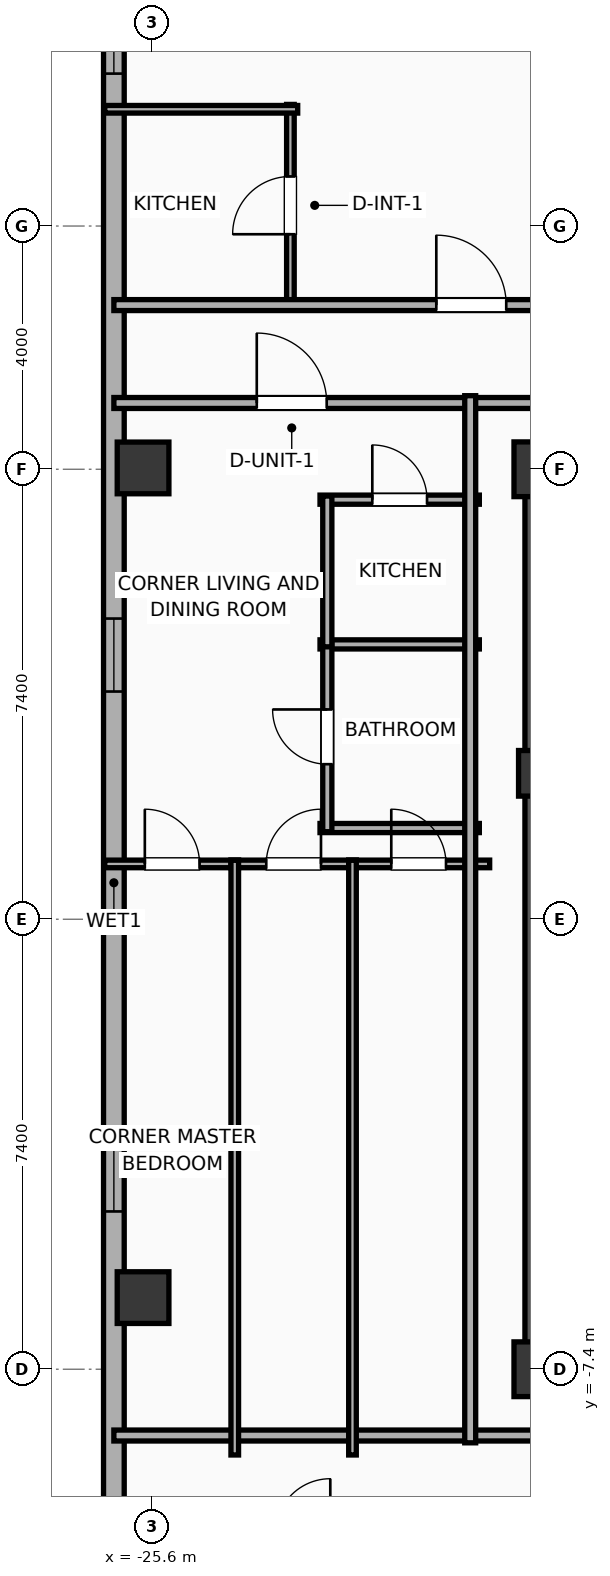
"""IFC4 building model, lengths in metres.
Left out: names, types, materials, properties, quantities, classifications, styles, units other than length and angle.
Written with IfcOpenShell. Run it as: python <this file> out.ifc"""

import sys

from ifc_helpers import new_model, si_unit, direction, frame, frame_2d, origin, origin_2d, place, context, subcontext, project, spatial, rectangle, hollow_rectangle, extrude, element, fill, save


model = new_model("IFC4")
c1 = context("Model", 3, precision=1e-05, world=origin(), true_north=direction((0.0, 1.0)))
c2 = subcontext(c1, "Body", "Model", "MODEL_VIEW")
j1 = project(units=[si_unit("LENGTHUNIT", "METRE"), si_unit("PLANEANGLEUNIT", "RADIAN")], contexts=[c1])
p1 = place(None, origin())
s1 = spatial("IfcSite", under=j1, at=p1, CompositionType="ELEMENT")
p2 = place(p1, origin())
s2 = spatial("IfcBuilding", under=s1, at=p2, CompositionType="ELEMENT")
p3 = place(p2, frame((0.0, 0.0, 235.3)))
s3 = spatial("IfcBuildingStorey", under=s2, at=p3, CompositionType="ELEMENT", Elevation=235.3)
p4 = place(p3, frame((-19.2, -7.4, 0.0), z_axis=(0.0, 0.0, 1.0), x_axis=(1.0, 0.0, 0.0)))
e1 = element("IfcColumn", 1, at=p4, inside=s3, PredefinedType="COLUMN", context=c2, shape_type="SweptSolid", body=[
    extrude(rectangle(XDim=0.9, YDim=0.9, at=origin_2d()), origin(), (0.0, 0.0, 1.0), 3.9),
])
p5 = place(p3, frame((-19.2, 2.4, 0.0), z_axis=(0.0, 0.0, 1.0), x_axis=(1.0, 0.0, 0.0)))
e2 = element("IfcColumn", 2, at=p5, inside=s3, PredefinedType="COLUMN", context=c2, shape_type="SweptSolid", body=[
    extrude(rectangle(XDim=0.75, YDim=0.75, at=origin_2d()), origin(), (0.0, 0.0, 1.0), 3.9),
])
p6 = place(p3, frame((-19.2, 7.4, 0.0), z_axis=(0.0, 0.0, 1.0), x_axis=(1.0, 0.0, 0.0)))
e3 = element("IfcColumn", 3, at=p6, inside=s3, PredefinedType="COLUMN", context=c2, shape_type="SweptSolid", body=[
    extrude(rectangle(XDim=0.9, YDim=0.9, at=origin_2d()), origin(), (0.0, 0.0, 1.0), 3.9),
])
for number, where, z_axis, x_axis in (
    (4, (-19.425, -7.4, 0.0), (0.0, 0.0, 1.0), (1.0, 0.0, 0.0)),
    (5, (-19.425, 7.4, 0.0), (0.0, 0.0, 1.0), (1.0, 0.0, 0.0)),
):
    element("IfcWall", number, at=place(p3, frame(where, z_axis=z_axis, x_axis=x_axis)), inside=s3, PredefinedType="SHEAR", context=c2, shape_type="SweptSolid", body=[
        extrude(rectangle(XDim=7.25, YDim=0.45, at=frame_2d((3.625, 0.0))), origin(), (0.0, 0.0, 1.0), 3.65),
    ])
p7 = place(p3, frame((-19.145, -7.4, 0.0), z_axis=(0.0, 0.0, 1.0), x_axis=(0.0, 1.0, 0.0)))
e6 = element("IfcWall", 6, at=p7, inside=s3, PredefinedType="SHEAR", context=c2, shape_type="SweptSolid", body=[
    extrude(rectangle(XDim=14.8, YDim=0.65, at=frame_2d((7.4, 0.0))), origin(), (0.0, 0.0, 1.0), 3.65),
])
for number, where, z_axis, x_axis in (
    (7, (-25.75, 7.422, 0.0), (0.0, 0.0, 1.0), (1.0, 0.0, 0.0)),
    (8, (-25.75, -6.222, 0.0), (0.0, 0.0, 1.0), (1.0, 0.0, 0.0)),
):
    element("IfcColumn", number, at=place(p3, frame(where, z_axis=z_axis, x_axis=x_axis)), inside=s3, PredefinedType="COLUMN", context=c2, shape_type="SweptSolid", body=[
        extrude(hollow_rectangle(XDim=0.85, YDim=0.85, WallThickness=0.028, at=origin_2d()), origin(), (0.0, 0.0, 1.0), 3.9),
    ])
p8 = place(p3, frame((-26.23, -15.383, 0.0), z_axis=(0.0, 0.0, 1.0), x_axis=(0.0, 1.0, 0.0)))
e9 = element("IfcWall", 9, at=p8, inside=s3, PredefinedType="ELEMENTEDWALL", context=c2, shape_type="SweptSolid", body=[
    extrude(rectangle(XDim=31.967, YDim=0.34, at=frame_2d((15.983, 0.0))), origin(), (0.0, 0.0, 1.0), 3.65),
])
p9 = place(p8, frame((29.29, 0.0, 0.75)))
e10 = element("IfcOpeningElement", 10, at=p9, cuts=e9, PredefinedType="OPENING", context=c2, shape_type="SweptSolid", body=[
    extrude(rectangle(XDim=1.2, YDim=2.05, at=frame_2d((0.6, 1.025))), frame((0.0, 0.18, 0.0), z_axis=(0.0, -1.0, 0.0), x_axis=(1.0, 0.0, 0.0)), (0.0, 0.0, 1.0), 0.36),
])
p10 = place(p8, frame((19.128, 0.0, 0.75)))
e11 = element("IfcOpeningElement", 11, at=p10, cuts=e9, PredefinedType="OPENING", context=c2, shape_type="SweptSolid", body=[
    extrude(rectangle(XDim=1.2, YDim=2.05, at=frame_2d((0.6, 1.025))), frame((0.0, 0.18, 0.0), z_axis=(0.0, -1.0, 0.0), x_axis=(1.0, 0.0, 0.0)), (0.0, 0.0, 1.0), 0.36),
])
p11 = place(p8, frame((10.578, 0.0, 0.75)))
e12 = element("IfcOpeningElement", 12, at=p11, cuts=e9, PredefinedType="OPENING", context=c2, shape_type="SweptSolid", body=[
    extrude(rectangle(XDim=1.2, YDim=2.05, at=frame_2d((0.6, 1.025))), frame((0.0, 0.18, 0.0), z_axis=(0.0, -1.0, 0.0), x_axis=(1.0, 0.0, 0.0)), (0.0, 0.0, 1.0), 0.36),
])
p12 = place(p3, frame((-26.23, 8.49, 0.0), z_axis=(0.0, 0.0, 1.0), x_axis=(1.0, 0.0, 0.0)))
e13 = element("IfcWall", 13, at=p12, inside=s3, PredefinedType="PARTITIONING", context=c2, shape_type="SweptSolid", body=[
    extrude(rectangle(XDim=16.35, YDim=0.18, at=frame_2d((8.175, 0.0))), origin(), (0.0, 0.0, 1.0), 3.65),
])
p13 = place(p12, frame((2.35, 0.0, 0.0)))
e14 = element("IfcOpeningElement", 14, at=p13, cuts=e13, PredefinedType="OPENING", context=c2, shape_type="SweptSolid", body=[
    extrude(rectangle(XDim=1.15, YDim=2.05, at=frame_2d((0.575, 1.025))), frame((0.0, 0.1, 0.0), z_axis=(0.0, -1.0, 0.0), x_axis=(1.0, 0.0, 0.0)), (0.0, 0.0, 1.0), 0.2),
])
p14 = place(p3, frame((-26.23, -8.49, 0.0), z_axis=(0.0, 0.0, 1.0), x_axis=(1.0, 0.0, 0.0)))
e15 = element("IfcWall", 15, at=p14, inside=s3, PredefinedType="PARTITIONING", context=c2, shape_type="SweptSolid", body=[
    extrude(rectangle(XDim=16.35, YDim=0.18, at=frame_2d((8.175, 0.0))), origin(), (0.0, 0.0, 1.0), 3.65),
])
p15 = place(p3, frame((-23.327, 10.08, 0.0), z_axis=(0.0, 0.0, 1.0), x_axis=(0.0, 1.0, 0.0)))
e16 = element("IfcWall", 16, at=p15, inside=s3, PredefinedType="PARTITIONING", context=c2, shape_type="SweptSolid", body=[
    extrude(rectangle(XDim=3.32, YDim=0.125, at=frame_2d((1.66, 0.0))), origin(), (0.0, 0.0, 1.0), 3.65),
])
p16 = place(p15, frame((1.185, 0.0, 0.0)))
e17 = element("IfcOpeningElement", 17, at=p16, cuts=e16, PredefinedType="OPENING", context=c2, shape_type="SweptSolid", body=[
    extrude(rectangle(XDim=0.95, YDim=2.05, at=frame_2d((0.475, 1.025))), frame((0.0, 0.073, 0.0), z_axis=(0.0, -1.0, 0.0), x_axis=(1.0, 0.0, 0.0)), (0.0, 0.0, 1.0), 0.145),
])
p17 = place(p3, frame((-26.38, 13.32, 0.0), z_axis=(0.0, 0.0, 1.0), x_axis=(1.0, 0.0, 0.0)))
e18 = element("IfcWall", 18, at=p17, inside=s3, PredefinedType="PARTITIONING", context=c2, shape_type="SweptSolid", body=[
    extrude(rectangle(XDim=3.173, YDim=0.125, at=frame_2d((1.586, 0.0))), origin(), (0.0, 0.0, 1.0), 3.65),
])
p18 = place(p3, frame((-26.23, 10.1, 0.0), z_axis=(0.0, 0.0, 1.0), x_axis=(1.0, 0.0, 0.0)))
e19 = element("IfcWall", 19, at=p18, inside=s3, PredefinedType="PARTITIONING", context=c2, shape_type="SweptSolid", body=[
    extrude(rectangle(XDim=56.46, YDim=0.18, at=frame_2d((28.23, 0.0))), origin(), (0.0, 0.0, 1.0), 3.65),
])
p19 = place(p18, frame((5.302, 0.0, 0.0)))
e20 = element("IfcOpeningElement", 20, at=p19, cuts=e19, PredefinedType="OPENING", context=c2, shape_type="SweptSolid", body=[
    extrude(rectangle(XDim=1.15, YDim=2.05, at=frame_2d((0.575, 1.025))), frame((0.0, 0.1, 0.0), z_axis=(0.0, -1.0, 0.0), x_axis=(1.0, 0.0, 0.0)), (0.0, 0.0, 1.0), 0.2),
])
p20 = place(p18, frame((14.122, 0.0, 0.0)))
e21 = element("IfcOpeningElement", 21, at=p20, cuts=e19, PredefinedType="OPENING", context=c2, shape_type="SweptSolid", body=[
    extrude(rectangle(XDim=1.15, YDim=2.05, at=frame_2d((0.575, 1.025))), frame((0.0, 0.1, 0.0), z_axis=(0.0, -1.0, 0.0), x_axis=(1.0, 0.0, 0.0)), (0.0, 0.0, 1.0), 0.2),
])
p21 = place(p18, frame((21.518, 0.0, 0.0)))
e22 = element("IfcOpeningElement", 22, at=p21, cuts=e19, PredefinedType="OPENING", context=c2, shape_type="SweptSolid", body=[
    extrude(rectangle(XDim=1.15, YDim=2.05, at=frame_2d((0.575, 1.025))), frame((0.0, 0.1, 0.0), z_axis=(0.0, -1.0, 0.0), x_axis=(1.0, 0.0, 0.0)), (0.0, 0.0, 1.0), 0.2),
])
p22 = place(p18, frame((28.92, 0.0, 0.0)))
e23 = element("IfcOpeningElement", 23, at=p22, cuts=e19, PredefinedType="OPENING", context=c2, shape_type="SweptSolid", body=[
    extrude(rectangle(XDim=1.15, YDim=2.05, at=frame_2d((0.575, 1.025))), frame((0.0, 0.1, 0.0), z_axis=(0.0, -1.0, 0.0), x_axis=(1.0, 0.0, 0.0)), (0.0, 0.0, 1.0), 0.2),
])
p23 = place(p18, frame((36.322, 0.0, 0.0)))
e24 = element("IfcOpeningElement", 24, at=p23, cuts=e19, PredefinedType="OPENING", context=c2, shape_type="SweptSolid", body=[
    extrude(rectangle(XDim=1.15, YDim=2.05, at=frame_2d((0.575, 1.025))), frame((0.0, 0.1, 0.0), z_axis=(0.0, -1.0, 0.0), x_axis=(1.0, 0.0, 0.0)), (0.0, 0.0, 1.0), 0.2),
])
p24 = place(p18, frame((43.622, 0.0, 0.0)))
e25 = element("IfcOpeningElement", 25, at=p24, cuts=e19, PredefinedType="OPENING", context=c2, shape_type="SweptSolid", body=[
    extrude(rectangle(XDim=1.15, YDim=2.05, at=frame_2d((0.575, 1.025))), frame((0.0, 0.1, 0.0), z_axis=(0.0, -1.0, 0.0), x_axis=(1.0, 0.0, 0.0)), (0.0, 0.0, 1.0), 0.2),
])
p25 = place(p18, frame((51.781, 0.0, 0.0)))
e26 = element("IfcOpeningElement", 26, at=p25, cuts=e19, PredefinedType="OPENING", context=c2, shape_type="SweptSolid", body=[
    extrude(rectangle(XDim=1.15, YDim=2.05, at=frame_2d((0.575, 1.025))), frame((0.0, 0.1, 0.0), z_axis=(0.0, -1.0, 0.0), x_axis=(1.0, 0.0, 0.0)), (0.0, 0.0, 1.0), 0.2),
])
p26 = place(p3, frame((-22.84, 6.9, 0.0), z_axis=(0.0, 0.0, 1.0), x_axis=(1.0, 0.0, 0.0)))
e27 = element("IfcWall", 27, at=p26, inside=s3, PredefinedType="PLUMBINGWALL", context=c2, shape_type="SweptSolid", body=[
    extrude(rectangle(XDim=2.62, YDim=0.15, at=frame_2d((1.31, 0.0))), origin(), (0.0, 0.0, 1.0), 3.65),
])
p27 = place(p26, frame((0.86, 0.0, 0.0)))
e28 = element("IfcOpeningElement", 28, at=p27, cuts=e27, PredefinedType="OPENING", context=c2, shape_type="SweptSolid", body=[
    extrude(rectangle(XDim=0.9, YDim=2.05, at=frame_2d((0.45, 1.025))), frame((0.0, 0.085, 0.0), z_axis=(0.0, -1.0, 0.0), x_axis=(1.0, 0.0, 0.0)), (0.0, 0.0, 1.0), 0.17),
])
for number, where, z_axis, x_axis in (
    (29, (-22.84, 4.52, 0.0), (0.0, 0.0, 1.0), (1.0, 0.0, 0.0)),
    (30, (-22.84, 1.5, 0.0), (0.0, 0.0, 1.0), (1.0, 0.0, 0.0)),
):
    element("IfcWall", number, at=place(p3, frame(where, z_axis=z_axis, x_axis=x_axis)), inside=s3, PredefinedType="PLUMBINGWALL", context=c2, shape_type="SweptSolid", body=[
        extrude(rectangle(XDim=2.62, YDim=0.15, at=frame_2d((1.31, 0.0))), origin(), (0.0, 0.0, 1.0), 3.65),
    ])
p28 = place(p3, frame((-22.72, 1.44, 0.0), z_axis=(0.0, 0.0, 1.0), x_axis=(0.0, 1.0, 0.0)))
e31 = element("IfcWall", 31, at=p28, inside=s3, PredefinedType="PLUMBINGWALL", context=c2, shape_type="SweptSolid", body=[
    extrude(rectangle(XDim=3.12, YDim=0.15, at=frame_2d((1.56, 0.0))), origin(), (0.0, 0.0, 1.0), 3.65),
])
p29 = place(p28, frame((1.11, 0.0, 0.0)))
e32 = element("IfcOpeningElement", 32, at=p29, cuts=e31, PredefinedType="OPENING", context=c2, shape_type="SweptSolid", body=[
    extrude(rectangle(XDim=0.9, YDim=2.05, at=frame_2d((0.45, 1.025))), frame((0.0, 0.085, 0.0), z_axis=(0.0, -1.0, 0.0), x_axis=(1.0, 0.0, 0.0)), (0.0, 0.0, 1.0), 0.17),
])
p30 = place(p3, frame((-22.72, 4.48, 0.0), z_axis=(0.0, 0.0, 1.0), x_axis=(0.0, 1.0, 0.0)))
e33 = element("IfcWall", 33, at=p30, inside=s3, PredefinedType="PLUMBINGWALL", context=c2, shape_type="SweptSolid", body=[
    extrude(rectangle(XDim=2.48, YDim=0.15, at=frame_2d((1.24, 0.0))), origin(), (0.0, 0.0, 1.0), 3.65),
])
p31 = place(p3, frame((-26.38, 0.91, 0.0), z_axis=(0.0, 0.0, 1.0), x_axis=(1.0, 0.0, 0.0)))
e34 = element("IfcWall", 34, at=p31, inside=s3, PredefinedType="PARTITIONING", context=c2, shape_type="SweptSolid", body=[
    extrude(rectangle(XDim=2.2, YDim=0.125, at=frame_2d((1.1, 0.0))), origin(), (0.0, 0.0, 1.0), 3.65),
])
p32 = place(p31, frame((0.659, 0.0, 0.0)))
e35 = element("IfcOpeningElement", 35, at=p32, cuts=e34, PredefinedType="OPENING", context=c2, shape_type="SweptSolid", body=[
    extrude(rectangle(XDim=0.9, YDim=2.05, at=frame_2d((0.45, 1.025))), frame((0.0, 0.073, 0.0), z_axis=(0.0, -1.0, 0.0), x_axis=(1.0, 0.0, 0.0)), (0.0, 0.0, 1.0), 0.145),
])
p33 = place(p3, frame((-24.304, 0.91, 0.0), z_axis=(0.0, 0.0, 1.0), x_axis=(1.0, 0.0, 0.0)))
e36 = element("IfcWall", 36, at=p33, inside=s3, PredefinedType="PARTITIONING", context=c2, shape_type="SweptSolid", body=[
    extrude(rectangle(XDim=2.061, YDim=0.125, at=frame_2d((1.031, 0.0))), origin(), (0.0, 0.0, 1.0), 3.65),
])
p34 = place(p33, frame((0.581, 0.0, 0.0)))
e37 = element("IfcOpeningElement", 37, at=p34, cuts=e36, PredefinedType="OPENING", context=c2, shape_type="SweptSolid", body=[
    extrude(rectangle(XDim=0.9, YDim=2.05, at=frame_2d((0.45, 1.025))), frame((0.0, 0.073, 0.0), z_axis=(0.0, -1.0, 0.0), x_axis=(1.0, 0.0, 0.0)), (0.0, 0.0, 1.0), 0.145),
])
p35 = place(p3, frame((-22.368, 0.91, 0.0), z_axis=(0.0, 0.0, 1.0), x_axis=(1.0, 0.0, 0.0)))
e38 = element("IfcWall", 38, at=p35, inside=s3, PredefinedType="PARTITIONING", context=c2, shape_type="SweptSolid", body=[
    extrude(rectangle(XDim=2.318, YDim=0.125, at=frame_2d((1.159, 0.0))), origin(), (0.0, 0.0, 1.0), 3.65),
])
p36 = place(p35, frame((0.7, 0.0, 0.0)))
e39 = element("IfcOpeningElement", 39, at=p36, cuts=e38, PredefinedType="OPENING", context=c2, shape_type="SweptSolid", body=[
    extrude(rectangle(XDim=0.9, YDim=2.05, at=frame_2d((0.45, 1.025))), frame((0.0, 0.073, 0.0), z_axis=(0.0, -1.0, 0.0), x_axis=(1.0, 0.0, 0.0)), (0.0, 0.0, 1.0), 0.145),
])
for number, where, z_axis, x_axis in (
    (40, (-22.306, -8.81, 0.0), (0.0, 0.0, 1.0), (0.0, 1.0, 0.0)),
    (41, (-24.242, -8.81, 0.0), (0.0, 0.0, 1.0), (0.0, 1.0, 0.0)),
):
    element("IfcWall", number, at=place(p3, frame(where, z_axis=z_axis, x_axis=x_axis)), inside=s3, PredefinedType="PARTITIONING", context=c2, shape_type="SweptSolid", body=[
        extrude(rectangle(XDim=9.78, YDim=0.125, at=frame_2d((4.89, 0.0))), origin(), (0.0, 0.0, 1.0), 3.65),
    ])
p37 = place(p3, frame((-20.37, -8.61, 0.0), z_axis=(0.0, 0.0, 1.0), x_axis=(0.0, 1.0, 0.0)))
e42 = element("IfcWall", 42, at=p37, inside=s3, PredefinedType="PARTITIONING", context=c2, shape_type="SweptSolid", body=[
    extrude(rectangle(XDim=17.22, YDim=0.18, at=frame_2d((8.61, 0.0))), origin(), (0.0, 0.0, 1.0), 3.65),
])
p38 = place(p9, origin())
e43 = element("IfcWindow", 43, at=p38, inside=s3, PartitioningType="SINGLE_PANEL", PredefinedType="WINDOW", context=c2, shape_type="SweptSolid", body=[
    extrude(rectangle(XDim=1.2, YDim=2.05, at=frame_2d((0.6, 1.025))), frame((0.0, 0.03, 0.0), z_axis=(0.0, -1.0, 0.0), x_axis=(1.0, 0.0, 0.0)), (0.0, 0.0, 1.0), 0.06),
])
fill(e10, e43)
p39 = place(p10, origin())
e44 = element("IfcWindow", 44, at=p39, inside=s3, PartitioningType="SINGLE_PANEL", PredefinedType="WINDOW", context=c2, shape_type="SweptSolid", body=[
    extrude(rectangle(XDim=1.2, YDim=2.05, at=frame_2d((0.6, 1.025))), frame((0.0, 0.03, 0.0), z_axis=(0.0, -1.0, 0.0), x_axis=(1.0, 0.0, 0.0)), (0.0, 0.0, 1.0), 0.06),
])
fill(e11, e44)
p40 = place(p11, origin())
e45 = element("IfcWindow", 45, at=p40, inside=s3, PartitioningType="SINGLE_PANEL", PredefinedType="WINDOW", context=c2, shape_type="SweptSolid", body=[
    extrude(rectangle(XDim=1.2, YDim=2.05, at=frame_2d((0.6, 1.025))), frame((0.0, 0.03, 0.0), z_axis=(0.0, -1.0, 0.0), x_axis=(1.0, 0.0, 0.0)), (0.0, 0.0, 1.0), 0.06),
])
fill(e12, e45)
p41 = place(p13, origin())
e46 = element("IfcDoor", 46, at=p41, inside=s3, OperationType="SINGLE_SWING_LEFT", PredefinedType="DOOR", context=c2, shape_type="SweptSolid", body=[
    extrude(rectangle(XDim=1.15, YDim=2.05, at=frame_2d((0.575, 1.025))), frame((0.0, 0.025, 0.0), z_axis=(0.0, -1.0, 0.0), x_axis=(1.0, 0.0, 0.0)), (0.0, 0.0, 1.0), 0.05),
])
fill(e14, e46)
p42 = place(p16, origin())
e47 = element("IfcDoor", 47, at=p42, inside=s3, OperationType="SINGLE_SWING_LEFT", PredefinedType="DOOR", context=c2, shape_type="SweptSolid", body=[
    extrude(rectangle(XDim=0.95, YDim=2.05, at=frame_2d((0.475, 1.025))), frame((0.0, 0.025, 0.0), z_axis=(0.0, -1.0, 0.0), x_axis=(1.0, 0.0, 0.0)), (0.0, 0.0, 1.0), 0.05),
])
fill(e17, e47)
p43 = place(p19, origin())
e48 = element("IfcDoor", 48, at=p43, inside=s3, OperationType="SINGLE_SWING_LEFT", PredefinedType="DOOR", context=c2, shape_type="SweptSolid", body=[
    extrude(rectangle(XDim=1.15, YDim=2.05, at=frame_2d((0.575, 1.025))), frame((0.0, 0.025, 0.0), z_axis=(0.0, -1.0, 0.0), x_axis=(1.0, 0.0, 0.0)), (0.0, 0.0, 1.0), 0.05),
])
fill(e20, e48)
p44 = place(p27, origin())
e49 = element("IfcDoor", 49, at=p44, inside=s3, OperationType="SINGLE_SWING_LEFT", PredefinedType="DOOR", context=c2, shape_type="SweptSolid", body=[
    extrude(rectangle(XDim=0.9, YDim=2.05, at=frame_2d((0.45, 1.025))), frame((0.0, 0.025, 0.0), z_axis=(0.0, -1.0, 0.0), x_axis=(1.0, 0.0, 0.0)), (0.0, 0.0, 1.0), 0.05),
])
fill(e28, e49)
p45 = place(p29, origin())
e50 = element("IfcDoor", 50, at=p45, inside=s3, OperationType="SINGLE_SWING_RIGHT", PredefinedType="DOOR", context=c2, shape_type="SweptSolid", body=[
    extrude(rectangle(XDim=0.9, YDim=2.05, at=frame_2d((0.45, 1.025))), frame((0.0, 0.025, 0.0), z_axis=(0.0, -1.0, 0.0), x_axis=(1.0, 0.0, 0.0)), (0.0, 0.0, 1.0), 0.05),
])
fill(e32, e50)
p46 = place(p32, origin())
e51 = element("IfcDoor", 51, at=p46, inside=s3, OperationType="SINGLE_SWING_LEFT", PredefinedType="DOOR", context=c2, shape_type="SweptSolid", body=[
    extrude(rectangle(XDim=0.9, YDim=2.05, at=frame_2d((0.45, 1.025))), frame((0.0, 0.025, 0.0), z_axis=(0.0, -1.0, 0.0), x_axis=(1.0, 0.0, 0.0)), (0.0, 0.0, 1.0), 0.05),
])
fill(e35, e51)
p47 = place(p34, origin())
e52 = element("IfcDoor", 52, at=p47, inside=s3, OperationType="SINGLE_SWING_RIGHT", PredefinedType="DOOR", context=c2, shape_type="SweptSolid", body=[
    extrude(rectangle(XDim=0.9, YDim=2.05, at=frame_2d((0.45, 1.025))), frame((0.0, 0.025, 0.0), z_axis=(0.0, -1.0, 0.0), x_axis=(1.0, 0.0, 0.0)), (0.0, 0.0, 1.0), 0.05),
])
fill(e37, e52)
p48 = place(p36, origin())
e53 = element("IfcDoor", 53, at=p48, inside=s3, OperationType="SINGLE_SWING_LEFT", PredefinedType="DOOR", context=c2, shape_type="SweptSolid", body=[
    extrude(rectangle(XDim=0.9, YDim=2.05, at=frame_2d((0.45, 1.025))), frame((0.0, 0.025, 0.0), z_axis=(0.0, -1.0, 0.0), x_axis=(1.0, 0.0, 0.0)), (0.0, 0.0, 1.0), 0.05),
])
fill(e39, e53)
save(model, sys.argv[1])
